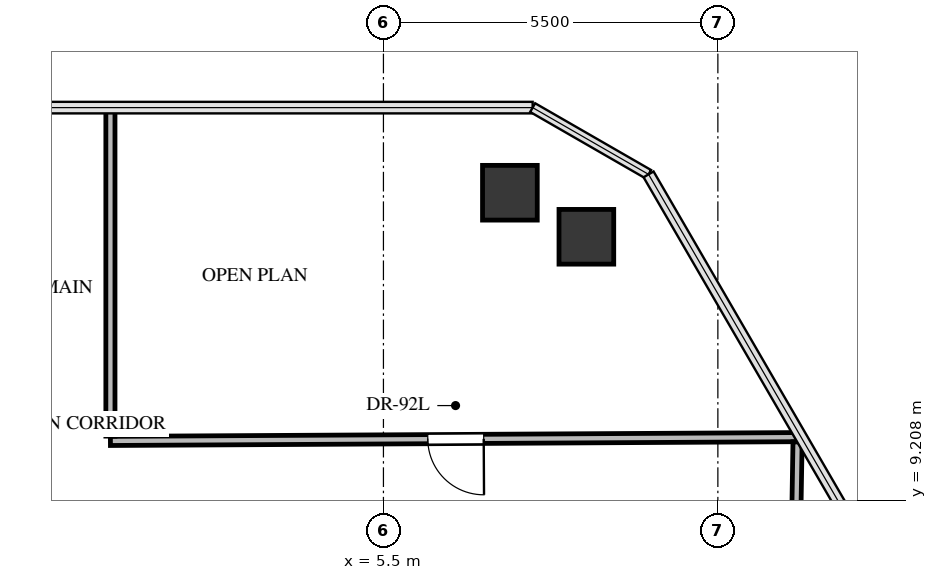
"""IFC4 building model, lengths in metres.
Left out: names, types, materials, properties, quantities, classifications, styles, units other than length and angle.
Written with IfcOpenShell. Run it as: python <this file> out.ifc"""

import sys

from ifc_helpers import new_model, si_unit, direction, frame, frame_2d, origin, origin_2d, place, context, subcontext, project, spatial, rectangle, extrude, source, transform, mapped, element, fill, save


model = new_model("IFC4")
c1 = context("Model", 3, precision=1e-05, world=origin(), true_north=direction((0.0, 1.0)))
c2 = subcontext(c1, "Body", "Model", "MODEL_VIEW")
j1 = project(units=[si_unit("LENGTHUNIT", "METRE"), si_unit("PLANEANGLEUNIT", "RADIAN")], contexts=[c1])
p1 = place(None, origin())
s1 = spatial("IfcSite", under=j1, at=p1, CompositionType="ELEMENT")
p2 = place(p1, origin())
s2 = spatial("IfcBuilding", under=s1, at=p2, CompositionType="ELEMENT")
p3 = place(p2, frame((0.0, 0.0, 244.7)))
s3 = spatial("IfcBuildingStorey", under=s2, at=p3, CompositionType="ELEMENT", Elevation=244.7)
m1 = source(origin(), c2, "Body", "SweptSolid", [
    extrude(rectangle(XDim=0.9, YDim=0.9, at=origin_2d()), origin(), (0.0, 0.0, 1.0), 3.3),
])
for number, where, z_axis, x_axis in (
    (1, (7.58, 14.262, -0.24), (0.0, 0.0, 1.0), (1.0, 0.0, 0.0)),
    (2, (8.837, 13.538, -0.24), (0.0, 0.0, 1.0), (1.0, 0.0, 0.0)),
):
    element("IfcColumn", number, at=place(p3, frame(where, z_axis=z_axis, x_axis=x_axis)), inside=s3, PredefinedType="COLUMN", context=c2, shape_type="MappedRepresentation", body=[
        mapped(m1, transform((0.0, 0.0, 0.0), x_axis=(1.0, 0.0, 0.0), y_axis=(0.0, 1.0, 0.0), z_axis=(0.0, 0.0, 1.0), scale=1.0)),
    ])
p4 = place(p3, frame((12.368, 10.243, 0.0), z_axis=(0.0, 0.0, 1.0), x_axis=(-0.999984623931, -0.005545439622, 0.0)))
e3 = element("IfcWall", 3, at=p4, inside=s3, PredefinedType="PARTITIONING", context=c2, shape_type="SweptSolid", body=[
    extrude(rectangle(XDim=11.359, YDim=0.15, at=frame_2d((5.679, 0.0))), origin(), (0.0, 0.0, 1.0), 2.301),
])
p5 = place(p4, frame((5.219, 0.0, 0.0)))
e4 = element("IfcOpeningElement", 4, at=p5, cuts=e3, PredefinedType="OPENING", context=c2, shape_type="SweptSolid", body=[
    extrude(rectangle(XDim=0.92, YDim=2.1, at=frame_2d((0.46, 1.05))), frame((0.0, 0.085, 0.0), z_axis=(0.0, -1.0, 0.0), x_axis=(1.0, 0.0, 0.0)), (0.0, 0.0, 1.0), 0.17),
])
p6 = place(p3, frame((1.01, 10.259, 0.0), z_axis=(0.0, 0.0, 1.0), x_axis=(0.0, 1.0, 0.0)))
e5 = element("IfcWall", 5, at=p6, inside=s3, PredefinedType="PARTITIONING", context=c2, shape_type="SweptSolid", body=[
    extrude(rectangle(XDim=5.403, YDim=0.15, at=frame_2d((2.702, 0.0))), origin(), (0.0, 0.0, 1.0), 2.399),
])
p7 = place(p3, frame((12.181, 2.49, 0.0), z_axis=(0.0, 0.0, 1.0), x_axis=(0.016828134389, 0.999858396921, 0.0)))
e6 = element("IfcWall", 6, at=p7, inside=s3, PredefinedType="PARTITIONING", context=c2, shape_type="SweptSolid", body=[
    extrude(rectangle(XDim=7.675, YDim=0.15, at=frame_2d((3.837, 0.0))), origin(), (0.0, 0.0, 1.0), 2.399),
])
p8 = place(p7, frame((3.362, 0.0, 0.0)))
e7 = element("IfcOpeningElement", 7, at=p8, cuts=e6, PredefinedType="OPENING", context=c2, shape_type="SweptSolid", body=[
    extrude(rectangle(XDim=0.95, YDim=2.1, at=frame_2d((0.475, 1.05))), frame((0.0, 0.085, 0.0), z_axis=(0.0, -1.0, 0.0), x_axis=(1.0, 0.0, 0.0)), (0.0, 0.0, 1.0), 0.17),
])
m2 = source(origin(), c2, "Body", "SweptSolid", [
    extrude(rectangle(XDim=0.92, YDim=2.1, at=frame_2d((0.46, 1.05))), frame((0.0, 0.025, 0.0), z_axis=(0.0, -1.0, 0.0), x_axis=(1.0, 0.0, 0.0)), (0.0, 0.0, 1.0), 0.05),
])
p9 = place(p5, origin())
e8 = element("IfcDoor", 8, at=p9, inside=s3, OperationType="SINGLE_SWING_LEFT", PredefinedType="DOOR", context=c2, shape_type="MappedRepresentation", body=[
    mapped(m2, transform((0.0, 0.0, 0.0), x_axis=(1.0, 0.0, 0.0), y_axis=(0.0, 1.0, 0.0), z_axis=(0.0, 0.0, 1.0), scale=1.0)),
])
fill(e4, e8)
save(model, sys.argv[1])
